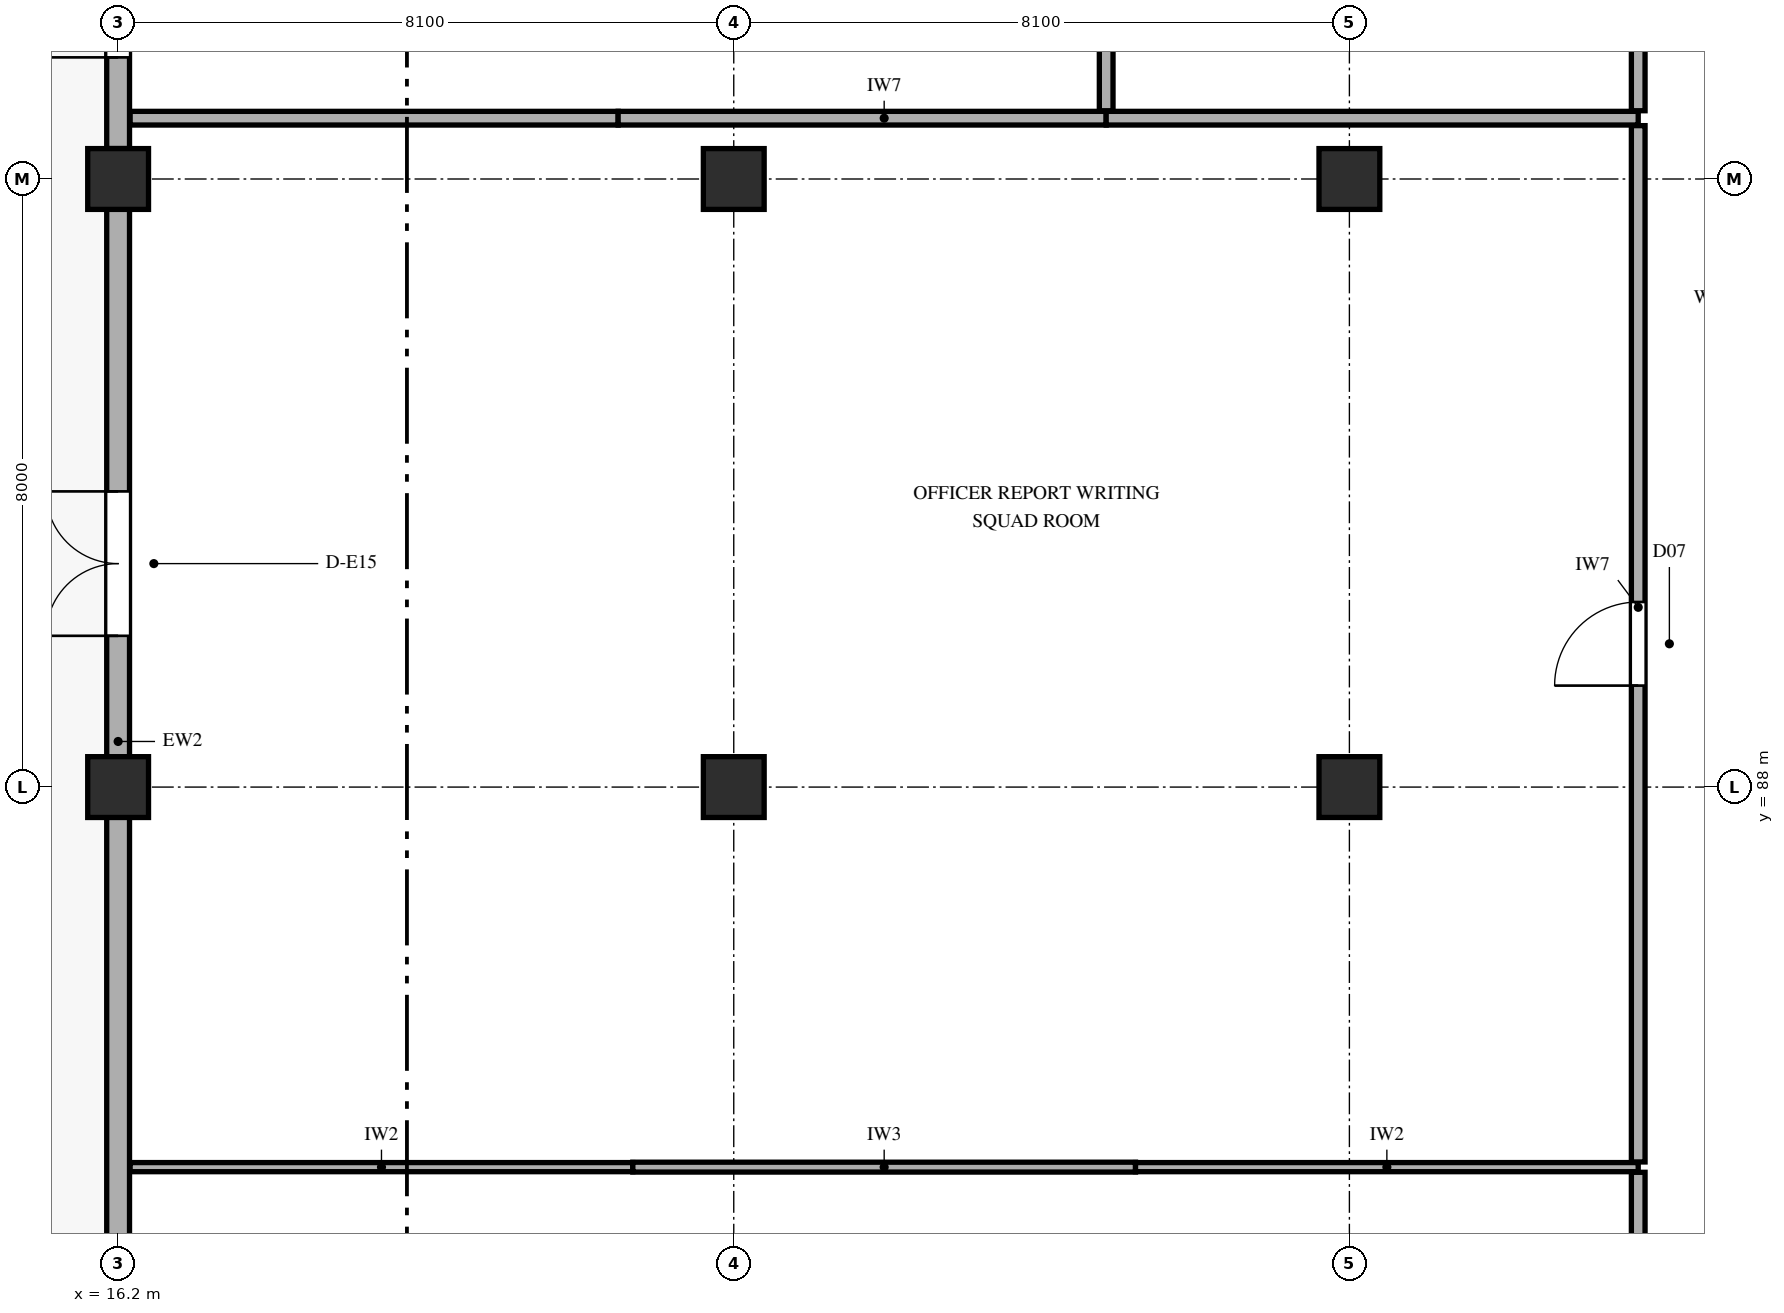
"""IFC4 building model, lengths in metres.
Left out: names, types, materials, properties, quantities, classifications, styles, units other than length and angle.
Written with IfcOpenShell. Run it as: python <this file> out.ifc"""

import sys

from ifc_helpers import new_model, si_unit, direction, frame, frame_2d, origin, origin_2d, place, context, subcontext, project, spatial, rectangle, extrude, element, fill, save


model = new_model("IFC4")
c1 = context("Model", 3, precision=1e-05, world=origin(), true_north=direction((0.0, 1.0)))
c2 = subcontext(c1, "Body", "Model", "MODEL_VIEW")
j1 = project(units=[si_unit("LENGTHUNIT", "METRE"), si_unit("PLANEANGLEUNIT", "RADIAN")], contexts=[c1])
p1 = place(None, origin())
s1 = spatial("IfcSite", under=j1, at=p1, CompositionType="ELEMENT")
p2 = place(p1, origin())
s2 = spatial("IfcBuilding", under=s1, at=p2, CompositionType="ELEMENT")
p3 = place(p2, origin())
s3 = spatial("IfcBuildingStorey", under=s2, at=p3, CompositionType="ELEMENT", Elevation=0.0)
for number, where, z_axis, x_axis in (
    (1, (16.2, 88.0, 0.0), (0.0, 0.0, 1.0), (1.0, 0.0, 0.0)),
    (2, (16.2, 96.0, 0.0), (0.0, 0.0, 1.0), (1.0, 0.0, 0.0)),
    (3, (24.3, 88.0, 0.0), (0.0, 0.0, 1.0), (1.0, 0.0, 0.0)),
    (4, (24.3, 96.0, 0.0), (0.0, 0.0, 1.0), (1.0, 0.0, 0.0)),
    (5, (32.4, 88.0, 0.0), (0.0, 0.0, 1.0), (1.0, 0.0, 0.0)),
    (6, (32.4, 96.0, 0.0), (0.0, 0.0, 1.0), (1.0, 0.0, 0.0)),
):
    element("IfcColumn", number, at=place(p3, frame(where, z_axis=z_axis, x_axis=x_axis)), inside=s3, PredefinedType="COLUMN", context=c2, shape_type="SweptSolid", body=[
        extrude(rectangle(XDim=0.8, YDim=0.8, at=origin_2d()), origin(), (0.0, 0.0, 1.0), 5.4),
    ])
p4 = place(p3, frame((16.2, 112.0, 0.0), z_axis=(0.0, 0.0, 1.0), x_axis=(0.0, -1.0, 0.0)))
e7 = element("IfcWall", 7, at=p4, inside=s3, PredefinedType="SOLIDWALL", context=c2, shape_type="SweptSolid", body=[
    extrude(rectangle(XDim=15.6, YDim=0.3, at=frame_2d((7.8, 0.0))), origin(), (0.0, 0.0, 1.0), 4.512),
])
p5 = place(p4, frame((12.6, 0.0, 0.0)))
e8 = element("IfcOpeningElement", 8, at=p5, cuts=e7, PredefinedType="OPENING", context=c2, shape_type="SweptSolid", body=[
    extrude(rectangle(XDim=1.8, YDim=2.4, at=frame_2d((0.9, 1.2))), frame((0.0, 0.16, 0.0), z_axis=(0.0, -1.0, 0.0), x_axis=(1.0, 0.0, 0.0)), (0.0, 0.0, 1.0), 0.32),
])
p6 = place(p3, frame((16.2, 96.4, 0.0), z_axis=(0.0, 0.0, 1.0), x_axis=(0.0, -1.0, 0.0)))
e9 = element("IfcWall", 9, at=p6, inside=s3, PredefinedType="SOLIDWALL", context=c2, shape_type="SweptSolid", body=[
    extrude(rectangle(XDim=15.6, YDim=0.3, at=frame_2d((7.8, 0.0))), origin(), (0.0, 0.0, 1.0), 4.512),
])
p7 = place(p6, frame((4.51, 0.0, 0.0)))
e10 = element("IfcOpeningElement", 10, at=p7, cuts=e9, PredefinedType="OPENING", context=c2, shape_type="SweptSolid", body=[
    extrude(rectangle(XDim=1.9, YDim=2.4, at=frame_2d((0.95, 1.2))), frame((0.0, 0.16, 0.0), z_axis=(0.0, -1.0, 0.0), x_axis=(1.0, 0.0, 0.0)), (0.0, 0.0, 1.0), 0.32),
])
p8 = place(p3, frame((16.358, 83.0, 0.0), z_axis=(0.0, 0.0, 1.0), x_axis=(1.0, 0.0, 0.0)))
e11 = element("IfcWall", 11, at=p8, inside=s3, PredefinedType="PARTITIONING", context=c2, shape_type="SweptSolid", body=[
    extrude(rectangle(XDim=6.614, YDim=0.12, at=frame_2d((3.307, 0.0))), origin(), (0.0, 0.0, 1.0), 5.12),
])
p9 = place(p3, frame((22.972, 83.0, 0.0), z_axis=(0.0, 0.0, 1.0), x_axis=(1.0, 0.0, 0.0)))
e12 = element("IfcWall", 12, at=p9, inside=s3, PredefinedType="PARTITIONING", context=c2, shape_type="SweptSolid", body=[
    extrude(rectangle(XDim=6.614, YDim=0.13, at=frame_2d((3.307, 0.0))), origin(), (0.0, 0.0, 1.0), 5.12),
])
p10 = place(p3, frame((29.586, 83.0, 0.0), z_axis=(0.0, 0.0, 1.0), x_axis=(1.0, 0.0, 0.0)))
e13 = element("IfcWall", 13, at=p10, inside=s3, PredefinedType="PARTITIONING", context=c2, shape_type="SweptSolid", body=[
    extrude(rectangle(XDim=6.614, YDim=0.12, at=frame_2d((3.307, 0.0))), origin(), (0.0, 0.0, 1.0), 5.12),
])
p11 = place(p3, frame((16.358, 96.8, 0.0), z_axis=(0.0, 0.0, 1.0), x_axis=(1.0, 0.0, 0.0)))
e14 = element("IfcWall", 14, at=p11, inside=s3, PredefinedType="PARTITIONING", context=c2, shape_type="SweptSolid", body=[
    extrude(rectangle(XDim=6.421, YDim=0.18, at=frame_2d((3.21, 0.0))), origin(), (0.0, 0.0, 1.0), 5.12),
])
p12 = place(p3, frame((22.779, 96.8, 0.0), z_axis=(0.0, 0.0, 1.0), x_axis=(1.0, 0.0, 0.0)))
e15 = element("IfcWall", 15, at=p12, inside=s3, PredefinedType="PARTITIONING", context=c2, shape_type="SweptSolid", body=[
    extrude(rectangle(XDim=6.421, YDim=0.18, at=frame_2d((3.21, 0.0))), origin(), (0.0, 0.0, 1.0), 5.12),
])
p13 = place(p3, frame((29.2, 96.8, 0.0), z_axis=(0.0, 0.0, 1.0), x_axis=(1.0, 0.0, 0.0)))
e16 = element("IfcWall", 16, at=p13, inside=s3, PredefinedType="PARTITIONING", context=c2, shape_type="SweptSolid", body=[
    extrude(rectangle(XDim=7.0, YDim=0.18, at=frame_2d((3.5, 0.0))), origin(), (0.0, 0.0, 1.0), 5.12),
])
p14 = place(p3, frame((29.2, 96.898, 0.0), z_axis=(0.0, 0.0, 1.0), x_axis=(0.0, 1.0, 0.0)))
e17 = element("IfcWall", 17, at=p14, inside=s3, PredefinedType="PARTITIONING", context=c2, shape_type="SweptSolid", body=[
    extrude(rectangle(XDim=3.194, YDim=0.18, at=frame_2d((1.597, 0.0))), origin(), (0.0, 0.0, 1.0), 5.12),
])
p15 = place(p14, frame((0.997, 0.0, 0.0)))
e18 = element("IfcOpeningElement", 18, at=p15, cuts=e17, PredefinedType="OPENING", context=c2, shape_type="SweptSolid", body=[
    extrude(rectangle(XDim=1.2, YDim=2.2, at=frame_2d((0.6, 1.1))), frame((0.0, 0.1, 0.0), z_axis=(0.0, -1.0, 0.0), x_axis=(1.0, 0.0, 0.0)), (0.0, 0.0, 1.0), 0.2),
])
p16 = place(p3, frame((36.2, 68.888, 0.0), z_axis=(0.0, 0.0, 1.0), x_axis=(0.0, 1.0, 0.0)))
e19 = element("IfcWall", 19, at=p16, inside=s3, PredefinedType="PARTITIONING", context=c2, shape_type="SweptSolid", body=[
    extrude(rectangle(XDim=14.044, YDim=0.18, at=frame_2d((7.022, 0.0))), origin(), (0.0, 0.0, 1.0), 4.705),
])
p17 = place(p16, frame((6.472, 0.0, 0.0)))
e20 = element("IfcOpeningElement", 20, at=p17, cuts=e19, PredefinedType="OPENING", context=c2, shape_type="SweptSolid", body=[
    extrude(rectangle(XDim=1.1, YDim=2.2, at=frame_2d((0.55, 1.1))), frame((0.0, 0.1, 0.0), z_axis=(0.0, -1.0, 0.0), x_axis=(1.0, 0.0, 0.0)), (0.0, 0.0, 1.0), 0.2),
])
p18 = place(p3, frame((36.2, 83.068, 0.0), z_axis=(0.0, 0.0, 1.0), x_axis=(0.0, 1.0, 0.0)))
e21 = element("IfcWall", 21, at=p18, inside=s3, PredefinedType="PARTITIONING", context=c2, shape_type="SweptSolid", body=[
    extrude(rectangle(XDim=13.634, YDim=0.18, at=frame_2d((6.817, 0.0))), origin(), (0.0, 0.0, 1.0), 4.705),
])
p19 = place(p18, frame((6.267, 0.0, 0.0)))
e22 = element("IfcOpeningElement", 22, at=p19, cuts=e21, PredefinedType="OPENING", context=c2, shape_type="SweptSolid", body=[
    extrude(rectangle(XDim=1.1, YDim=2.2, at=frame_2d((0.55, 1.1))), frame((0.0, 0.1, 0.0), z_axis=(0.0, -1.0, 0.0), x_axis=(1.0, 0.0, 0.0)), (0.0, 0.0, 1.0), 0.2),
])
p20 = place(p3, frame((36.2, 96.898, 0.0), z_axis=(0.0, 0.0, 1.0), x_axis=(0.0, 1.0, 0.0)))
e23 = element("IfcWall", 23, at=p20, inside=s3, PredefinedType="PARTITIONING", context=c2, shape_type="SweptSolid", body=[
    extrude(rectangle(XDim=3.404, YDim=0.18, at=frame_2d((1.702, 0.0))), origin(), (0.0, 0.0, 1.0), 4.809),
])
p21 = place(p20, frame((1.152, 0.0, 0.0)))
e24 = element("IfcOpeningElement", 24, at=p21, cuts=e23, PredefinedType="OPENING", context=c2, shape_type="SweptSolid", body=[
    extrude(rectangle(XDim=1.1, YDim=2.2, at=frame_2d((0.55, 1.1))), frame((0.0, 0.1, 0.0), z_axis=(0.0, -1.0, 0.0), x_axis=(1.0, 0.0, 0.0)), (0.0, 0.0, 1.0), 0.2),
])
p22 = place(p5, frame((1.8, 0.0, 0.0), z_axis=(0.0, 0.0, 1.0), x_axis=(-1.0, 0.0, 0.0)))
e25 = element("IfcDoor", 25, at=p22, inside=s3, OperationType="DOUBLE_DOOR_SINGLE_SWING", PredefinedType="DOOR", context=c2, shape_type="SweptSolid", body=[
    extrude(rectangle(XDim=1.8, YDim=2.4, at=frame_2d((0.9, 1.2))), frame((0.0, 0.025, 0.0), z_axis=(0.0, -1.0, 0.0), x_axis=(1.0, 0.0, 0.0)), (0.0, 0.0, 1.0), 0.05),
])
fill(e8, e25)
p23 = place(p7, frame((1.9, 0.0, 0.0), z_axis=(0.0, 0.0, 1.0), x_axis=(-1.0, 0.0, 0.0)))
e26 = element("IfcDoor", 26, at=p23, inside=s3, OperationType="DOUBLE_DOOR_SINGLE_SWING", PredefinedType="DOOR", context=c2, shape_type="SweptSolid", body=[
    extrude(rectangle(XDim=1.9, YDim=2.4, at=frame_2d((0.95, 1.2))), frame((0.0, 0.025, 0.0), z_axis=(0.0, -1.0, 0.0), x_axis=(1.0, 0.0, 0.0)), (0.0, 0.0, 1.0), 0.05),
])
fill(e10, e26)
p24 = place(p19, origin())
e27 = element("IfcDoor", 27, at=p24, inside=s3, OperationType="SINGLE_SWING_LEFT", PredefinedType="DOOR", context=c2, shape_type="SweptSolid", body=[
    extrude(rectangle(XDim=1.1, YDim=2.2, at=frame_2d((0.55, 1.1))), frame((0.0, 0.025, 0.0), z_axis=(0.0, -1.0, 0.0), x_axis=(1.0, 0.0, 0.0)), (0.0, 0.0, 1.0), 0.05),
])
fill(e22, e27)
save(model, sys.argv[1])
